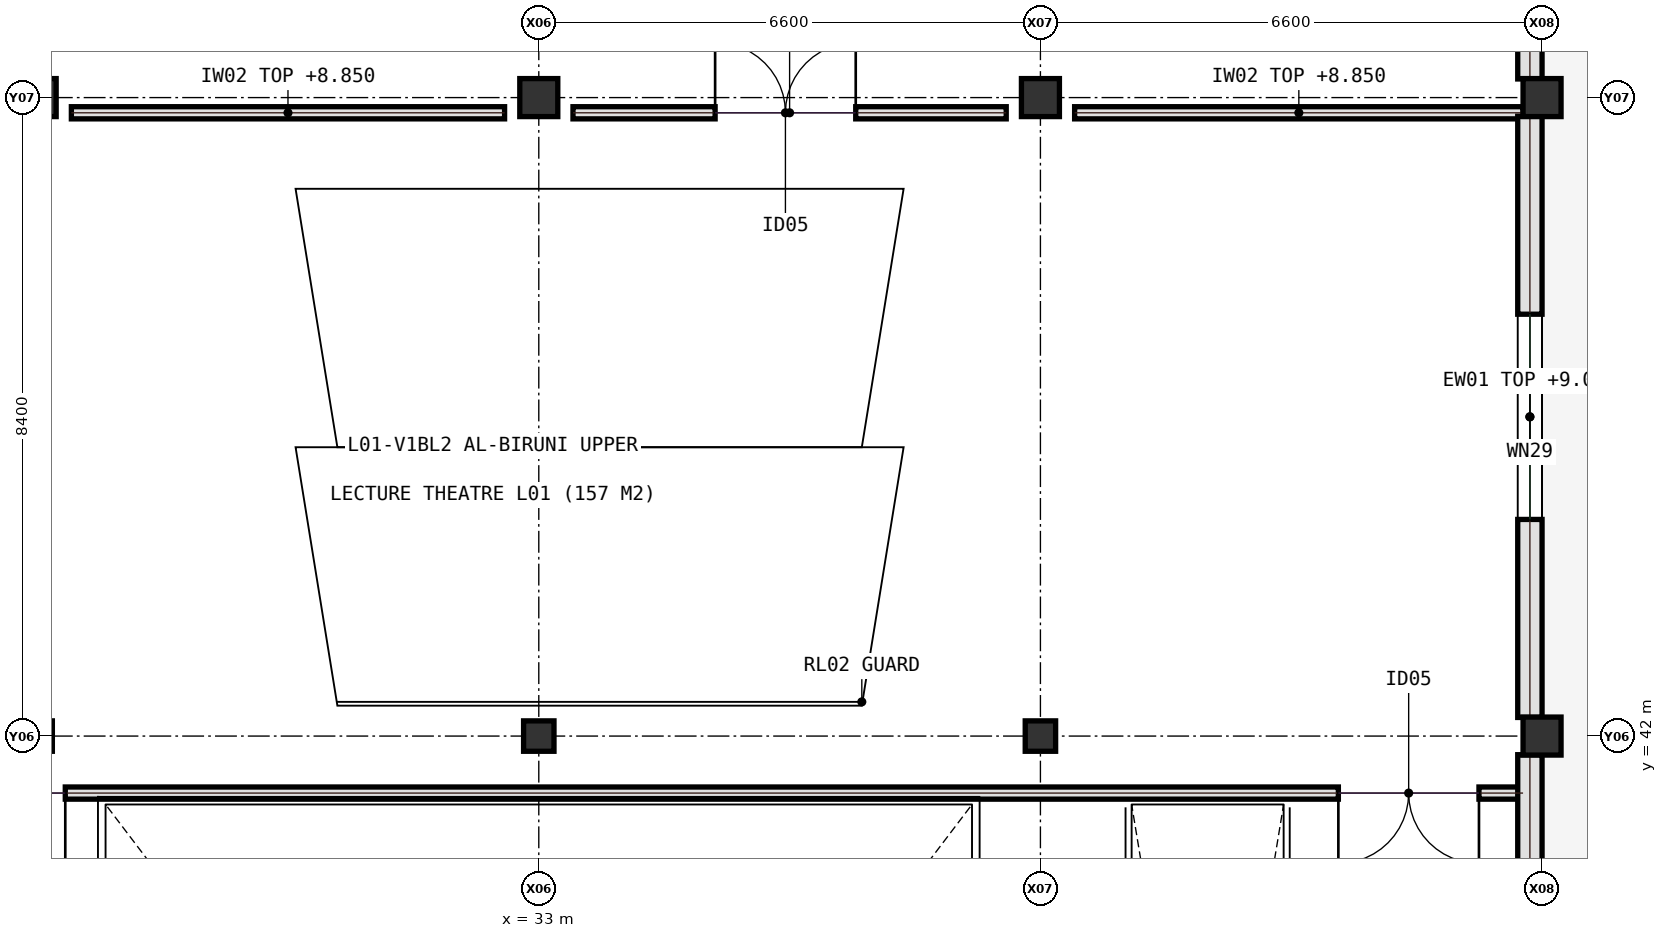
"""IFC4 building model, lengths in metres.
Left out: names, types, materials, properties, quantities, classifications, styles, units other than length and angle.
Written with IfcOpenShell. Run it as: python <this file> out.ifc"""

import sys

from ifc_helpers import new_model, si_unit, direction, frame, frame_2d, origin, origin_2d, place, context, subcontext, project, spatial, rectangle, extrude, element, fill, save


model = new_model("IFC4")
c1 = context("Model", 3, precision=1e-05, world=origin(), true_north=direction((0.0, 1.0)))
c2 = subcontext(c1, "Body", "Model", "MODEL_VIEW")
j1 = project(units=[si_unit("LENGTHUNIT", "METRE"), si_unit("PLANEANGLEUNIT", "RADIAN")], contexts=[c1])
p1 = place(None, origin())
s1 = spatial("IfcSite", under=j1, at=p1, CompositionType="ELEMENT")
p2 = place(p1, origin())
s2 = spatial("IfcBuilding", under=s1, at=p2, CompositionType="ELEMENT")
p3 = place(p2, frame((0.0, 0.0, 5.4)))
s3 = spatial("IfcBuildingStorey", under=s2, at=p3, CompositionType="ELEMENT", Elevation=5.4)
p4 = place(p3, frame((26.4, 50.4, 0.0), z_axis=(0.0, 0.0, 1.0), x_axis=(1.0, 0.0, 0.0)))
e1 = element("IfcColumn", 1, at=p4, inside=s3, PredefinedType="COLUMN", context=c2, shape_type="SweptSolid", body=[
    extrude(rectangle(XDim=0.5, YDim=0.5, at=origin_2d()), origin(), (0.0, 0.0, 1.0), 4.5),
])
p5 = place(p3, frame((33.0, 42.0, 0.0), z_axis=(0.0, 0.0, 1.0), x_axis=(1.0, 0.0, 0.0)))
e2 = element("IfcColumn", 2, at=p5, inside=s3, PredefinedType="COLUMN", context=c2, shape_type="SweptSolid", body=[
    extrude(rectangle(XDim=0.4, YDim=0.4, at=origin_2d()), origin(), (0.0, 0.0, 1.0), 4.5),
])
p6 = place(p3, frame((33.0, 50.4, 0.0), z_axis=(0.0, 0.0, 1.0), x_axis=(1.0, 0.0, 0.0)))
e3 = element("IfcColumn", 3, at=p6, inside=s3, PredefinedType="COLUMN", context=c2, shape_type="SweptSolid", body=[
    extrude(rectangle(XDim=0.5, YDim=0.5, at=origin_2d()), origin(), (0.0, 0.0, 1.0), 4.5),
])
p7 = place(p3, frame((39.6, 42.0, 0.0), z_axis=(0.0, 0.0, 1.0), x_axis=(1.0, 0.0, 0.0)))
e4 = element("IfcColumn", 4, at=p7, inside=s3, PredefinedType="COLUMN", context=c2, shape_type="SweptSolid", body=[
    extrude(rectangle(XDim=0.4, YDim=0.4, at=origin_2d()), origin(), (0.0, 0.0, 1.0), 4.5),
])
for number, where, z_axis, x_axis in (
    (5, (39.6, 50.4, 0.0), (0.0, 0.0, 1.0), (1.0, 0.0, 0.0)),
    (6, (46.2, 42.0, 0.0), (0.0, 0.0, 1.0), (1.0, 0.0, 0.0)),
    (7, (46.2, 50.4, 0.0), (0.0, 0.0, 1.0), (1.0, 0.0, 0.0)),
):
    element("IfcColumn", number, at=place(p3, frame(where, z_axis=z_axis, x_axis=x_axis)), inside=s3, PredefinedType="COLUMN", context=c2, shape_type="SweptSolid", body=[
        extrude(rectangle(XDim=0.5, YDim=0.5, at=origin_2d()), origin(), (0.0, 0.0, 1.0), 4.5),
    ])
p8 = place(p3, frame((0.32, 41.25, 0.0), z_axis=(0.0, 0.0, 1.0), x_axis=(1.0, 0.0, 0.0)))
e8 = element("IfcWall", 8, at=p8, inside=s3, PredefinedType="PARTITIONING", context=c2, shape_type="SweptSolid", body=[
    extrude(rectangle(XDim=45.63, YDim=0.16, at=frame_2d((22.815, 0.0))), origin(), (0.0, 0.0, 1.0), 3.45),
])
p9 = place(p8, frame((1.9, 0.0, 0.0)))
e9 = element("IfcOpeningElement", 9, at=p9, cuts=e8, PredefinedType="OPENING", context=c2, shape_type="SweptSolid", body=[
    extrude(rectangle(XDim=1.85, YDim=2.25, at=frame_2d((0.925, 1.125))), frame((0.0, 0.09, 0.0), z_axis=(0.0, -1.0, 0.0), x_axis=(1.0, 0.0, 0.0)), (0.0, 0.0, 1.0), 0.18),
])
p10 = place(p8, frame((24.6, 0.0, 0.0)))
e10 = element("IfcOpeningElement", 10, at=p10, cuts=e8, PredefinedType="OPENING", context=c2, shape_type="SweptSolid", body=[
    extrude(rectangle(XDim=1.85, YDim=2.25, at=frame_2d((0.925, 1.125))), frame((0.0, 0.09, 0.0), z_axis=(0.0, -1.0, 0.0), x_axis=(1.0, 0.0, 0.0)), (0.0, 0.0, 1.0), 0.18),
])
p11 = place(p8, frame((43.2, 0.0, 0.0)))
e11 = element("IfcOpeningElement", 11, at=p11, cuts=e8, PredefinedType="OPENING", context=c2, shape_type="SweptSolid", body=[
    extrude(rectangle(XDim=1.85, YDim=2.25, at=frame_2d((0.925, 1.125))), frame((0.0, 0.09, 0.0), z_axis=(0.0, -1.0, 0.0), x_axis=(1.0, 0.0, 0.0)), (0.0, 0.0, 1.0), 0.18),
])
p12 = place(p3, frame((26.85, 50.2, 0.0), z_axis=(0.0, 0.0, 1.0), x_axis=(1.0, 0.0, 0.0)))
e12 = element("IfcWall", 12, at=p12, inside=s3, PredefinedType="PARTITIONING", context=c2, shape_type="SweptSolid", body=[
    extrude(rectangle(XDim=5.7, YDim=0.16, at=frame_2d((2.85, 0.0))), origin(), (0.0, 0.0, 1.0), 3.45),
])
p13 = place(p3, frame((33.45, 50.2, 0.0), z_axis=(0.0, 0.0, 1.0), x_axis=(1.0, 0.0, 0.0)))
e13 = element("IfcWall", 13, at=p13, inside=s3, PredefinedType="PARTITIONING", context=c2, shape_type="SweptSolid", body=[
    extrude(rectangle(XDim=5.7, YDim=0.16, at=frame_2d((2.85, 0.0))), origin(), (0.0, 0.0, 1.0), 3.45),
])
p14 = place(p13, frame((1.87, 0.0, 0.0)))
e14 = element("IfcOpeningElement", 14, at=p14, cuts=e13, PredefinedType="OPENING", context=c2, shape_type="SweptSolid", body=[
    extrude(rectangle(XDim=1.85, YDim=2.25, at=frame_2d((0.925, 1.125))), frame((0.0, 0.09, 0.0), z_axis=(0.0, -1.0, 0.0), x_axis=(1.0, 0.0, 0.0)), (0.0, 0.0, 1.0), 0.18),
])
p15 = place(p3, frame((40.05, 50.2, 0.0), z_axis=(0.0, 0.0, 1.0), x_axis=(1.0, 0.0, 0.0)))
e15 = element("IfcWall", 15, at=p15, inside=s3, PredefinedType="PARTITIONING", context=c2, shape_type="SweptSolid", body=[
    extrude(rectangle(XDim=5.9, YDim=0.16, at=frame_2d((2.95, 0.0))), origin(), (0.0, 0.0, 1.0), 3.45),
])
p16 = place(p3, frame((46.04, 33.845, 0.0), z_axis=(0.0, 0.0, 1.0), x_axis=(0.0, 1.0, 0.0)))
e16 = element("IfcWall", 16, at=p16, inside=s3, PredefinedType="SOLIDWALL", context=c2, shape_type="SweptSolid", body=[
    extrude(rectangle(XDim=7.91, YDim=0.32, at=frame_2d((3.955, 0.0))), origin(), (0.0, 0.0, 1.0), 3.485),
])
p17 = place(p16, frame((2.655, 0.0, 0.95)))
e17 = element("IfcOpeningElement", 17, at=p17, cuts=e16, PredefinedType="OPENING", context=c2, shape_type="SweptSolid", body=[
    extrude(rectangle(XDim=2.6, YDim=1.9, at=frame_2d((1.3, 0.95))), frame((0.0, 0.17, 0.0), z_axis=(0.0, -1.0, 0.0), x_axis=(1.0, 0.0, 0.0)), (0.0, 0.0, 1.0), 0.34),
])
p18 = place(p3, frame((46.04, 42.245, 0.0), z_axis=(0.0, 0.0, 1.0), x_axis=(0.0, 1.0, 0.0)))
e18 = element("IfcWall", 18, at=p18, inside=s3, PredefinedType="SOLIDWALL", context=c2, shape_type="SweptSolid", body=[
    extrude(rectangle(XDim=7.91, YDim=0.32, at=frame_2d((3.955, 0.0))), origin(), (0.0, 0.0, 1.0), 3.635),
])
p19 = place(p18, frame((2.605, 0.0, 0.95)))
e19 = element("IfcOpeningElement", 19, at=p19, cuts=e18, PredefinedType="OPENING", context=c2, shape_type="SweptSolid", body=[
    extrude(rectangle(XDim=2.7, YDim=2.05, at=frame_2d((1.35, 1.025))), frame((0.0, 0.17, 0.0), z_axis=(0.0, -1.0, 0.0), x_axis=(1.0, 0.0, 0.0)), (0.0, 0.0, 1.0), 0.34),
])
p20 = place(p3, frame((46.04, 50.645, 0.0), z_axis=(0.0, 0.0, 1.0), x_axis=(0.0, 1.0, 0.0)))
e20 = element("IfcWall", 20, at=p20, inside=s3, PredefinedType="SOLIDWALL", context=c2, shape_type="SweptSolid", body=[
    extrude(rectangle(XDim=7.91, YDim=0.32, at=frame_2d((3.955, 0.0))), origin(), (0.0, 0.0, 1.0), 3.485),
])
p21 = place(p20, frame((2.405, 0.0, 0.95)))
e21 = element("IfcOpeningElement", 21, at=p21, cuts=e20, PredefinedType="OPENING", context=c2, shape_type="SweptSolid", body=[
    extrude(rectangle(XDim=3.1, YDim=2.05, at=frame_2d((1.55, 1.025))), frame((0.0, 0.17, 0.0), z_axis=(0.0, -1.0, 0.0), x_axis=(1.0, 0.0, 0.0)), (0.0, 0.0, 1.0), 0.34),
])
p22 = place(p10, frame((1.85, 0.0, 0.0), z_axis=(0.0, 0.0, 1.0), x_axis=(-1.0, 0.0, 0.0)))
e22 = element("IfcDoor", 22, at=p22, inside=s3, OperationType="DOUBLE_DOOR_SINGLE_SWING", PredefinedType="DOOR", context=c2, shape_type="SweptSolid", body=[
    extrude(rectangle(XDim=1.85, YDim=2.25, at=frame_2d((0.925, 1.125))), frame((0.0, 0.025, 0.0), z_axis=(0.0, -1.0, 0.0), x_axis=(1.0, 0.0, 0.0)), (0.0, 0.0, 1.0), 0.05),
])
fill(e10, e22)
p23 = place(p11, frame((1.85, 0.0, 0.0), z_axis=(0.0, 0.0, 1.0), x_axis=(-1.0, 0.0, 0.0)))
e23 = element("IfcDoor", 23, at=p23, inside=s3, OperationType="DOUBLE_DOOR_SINGLE_SWING", PredefinedType="DOOR", context=c2, shape_type="SweptSolid", body=[
    extrude(rectangle(XDim=1.85, YDim=2.25, at=frame_2d((0.925, 1.125))), frame((0.0, 0.025, 0.0), z_axis=(0.0, -1.0, 0.0), x_axis=(1.0, 0.0, 0.0)), (0.0, 0.0, 1.0), 0.05),
])
fill(e11, e23)
p24 = place(p14, origin())
e24 = element("IfcDoor", 24, at=p24, inside=s3, OperationType="DOUBLE_DOOR_SINGLE_SWING", PredefinedType="DOOR", context=c2, shape_type="SweptSolid", body=[
    extrude(rectangle(XDim=1.85, YDim=2.25, at=frame_2d((0.925, 1.125))), frame((0.0, 0.025, 0.0), z_axis=(0.0, -1.0, 0.0), x_axis=(1.0, 0.0, 0.0)), (0.0, 0.0, 1.0), 0.05),
])
fill(e14, e24)
p25 = place(p19, origin())
e25 = element("IfcWindow", 25, at=p25, inside=s3, PartitioningType="SINGLE_PANEL", PredefinedType="WINDOW", context=c2, shape_type="SweptSolid", body=[
    extrude(rectangle(XDim=2.7, YDim=2.05, at=frame_2d((1.35, 1.025))), frame((0.0, 0.03, 0.0), z_axis=(0.0, -1.0, 0.0), x_axis=(1.0, 0.0, 0.0)), (0.0, 0.0, 1.0), 0.06),
])
fill(e19, e25)
save(model, sys.argv[1])
